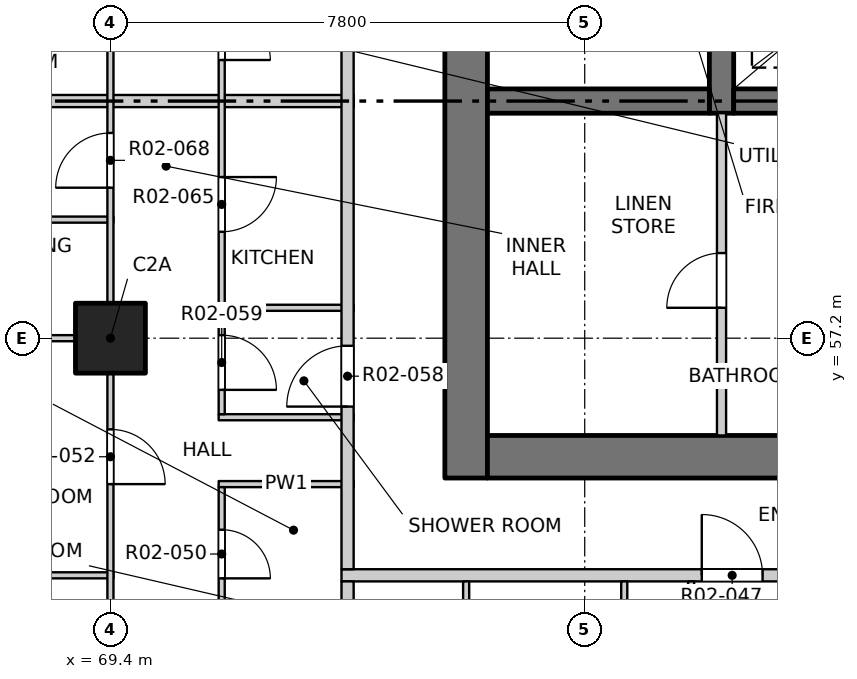
"""IFC4 building model, lengths in metres.
Left out: names, types, materials, properties, quantities, classifications, styles, units other than length and angle.
Written with IfcOpenShell. Run it as: python <this file> out.ifc"""

import sys

from ifc_helpers import new_model, si_unit, direction, frame, frame_2d, origin, origin_2d, place, context, subcontext, project, spatial, rectangle, extrude, element, fill, save


model = new_model("IFC4")
c1 = context("Model", 3, precision=1e-05, world=origin(), true_north=direction((0.0, 1.0)))
c2 = subcontext(c1, "Body", "Model", "MODEL_VIEW")
j1 = project(units=[si_unit("LENGTHUNIT", "METRE"), si_unit("PLANEANGLEUNIT", "RADIAN")], contexts=[c1])
p1 = place(None, origin())
s1 = spatial("IfcSite", under=j1, at=p1, CompositionType="ELEMENT")
p2 = place(p1, origin())
s2 = spatial("IfcBuilding", under=s1, at=p2, CompositionType="ELEMENT")
p3 = place(p2, frame((0.0, 0.0, 29.7)))
s3 = spatial("IfcBuildingStorey", under=s2, at=p3, CompositionType="ELEMENT", Elevation=29.7)
p4 = place(p3, frame((69.4, 57.2, -0.25), z_axis=(0.0, 0.0, 1.0), x_axis=(1.0, 0.0, 0.0)))
e1 = element("IfcColumn", 1, at=p4, inside=s3, PredefinedType="COLUMN", context=c2, shape_type="SweptSolid", body=[
    extrude(rectangle(XDim=1.15, YDim=1.15, at=origin_2d()), origin(), (0.0, 0.0, 1.0), 3.4),
])
p5 = place(p3, frame((75.25, 54.9, -0.25), z_axis=(0.0, 0.0, 1.0), x_axis=(0.0, 1.0, 0.0)))
e2 = element("IfcWall", 2, at=p5, inside=s3, PredefinedType="SOLIDWALL", context=c2, shape_type="SweptSolid", body=[
    extrude(rectangle(XDim=22.4, YDim=0.7, at=frame_2d((11.2, 0.0))), origin(), (0.0, 0.0, 1.0), 3.4),
])
p6 = place(p5, frame((7.55, 0.0, 0.25)))
e3 = element("IfcOpeningElement", 3, at=p6, cuts=e2, PredefinedType="OPENING", context=c2, shape_type="SweptSolid", body=[
    extrude(rectangle(XDim=0.9, YDim=2.1, at=frame_2d((0.45, 1.05))), frame((0.0, 0.36, 0.0), z_axis=(0.0, -1.0, 0.0), x_axis=(1.0, 0.0, 0.0)), (0.0, 0.0, 1.0), 0.72),
])
p7 = place(p5, frame((10.85, 0.0, 0.25)))
e4 = element("IfcOpeningElement", 4, at=p7, cuts=e2, PredefinedType="OPENING", context=c2, shape_type="SweptSolid", body=[
    extrude(rectangle(XDim=0.9, YDim=2.1, at=frame_2d((0.45, 1.05))), frame((0.0, 0.36, 0.0), z_axis=(0.0, -1.0, 0.0), x_axis=(1.0, 0.0, 0.0)), (0.0, 0.0, 1.0), 0.72),
])
p8 = place(p5, frame((13.85, 0.0, 0.25)))
e5 = element("IfcOpeningElement", 5, at=p8, cuts=e2, PredefinedType="OPENING", context=c2, shape_type="SweptSolid", body=[
    extrude(rectangle(XDim=0.9, YDim=2.1, at=frame_2d((0.45, 1.05))), frame((0.0, 0.36, 0.0), z_axis=(0.0, -1.0, 0.0), x_axis=(1.0, 0.0, 0.0)), (0.0, 0.0, 1.0), 0.72),
])
p9 = place(p5, frame((16.85, 0.0, 0.25)))
e6 = element("IfcOpeningElement", 6, at=p9, cuts=e2, PredefinedType="OPENING", context=c2, shape_type="SweptSolid", body=[
    extrude(rectangle(XDim=0.9, YDim=2.1, at=frame_2d((0.45, 1.05))), frame((0.0, 0.36, 0.0), z_axis=(0.0, -1.0, 0.0), x_axis=(1.0, 0.0, 0.0)), (0.0, 0.0, 1.0), 0.72),
])
p10 = place(p5, frame((20.15, 0.0, 0.25)))
e7 = element("IfcOpeningElement", 7, at=p10, cuts=e2, PredefinedType="OPENING", context=c2, shape_type="SweptSolid", body=[
    extrude(rectangle(XDim=0.9, YDim=2.1, at=frame_2d((0.45, 1.05))), frame((0.0, 0.36, 0.0), z_axis=(0.0, -1.0, 0.0), x_axis=(1.0, 0.0, 0.0)), (0.0, 0.0, 1.0), 0.72),
])
p11 = place(p3, frame((75.6, 55.25, -0.25), z_axis=(0.0, 0.0, 1.0), x_axis=(1.0, 0.0, 0.0)))
e8 = element("IfcWall", 8, at=p11, inside=s3, PredefinedType="SOLIDWALL", context=c2, shape_type="SweptSolid", body=[
    extrude(rectangle(XDim=18.8, YDim=0.7, at=frame_2d((9.4, 0.0))), origin(), (0.0, 0.0, 1.0), 3.4),
])
p12 = place(p11, frame((8.65, 0.0, 0.25)))
e9 = element("IfcOpeningElement", 9, at=p12, cuts=e8, PredefinedType="OPENING", context=c2, shape_type="SweptSolid", body=[
    extrude(rectangle(XDim=1.5, YDim=2.1, at=frame_2d((0.75, 1.05))), frame((0.0, 0.36, 0.0), z_axis=(0.0, -1.0, 0.0), x_axis=(1.0, 0.0, 0.0)), (0.0, 0.0, 1.0), 0.72),
])
p13 = place(p3, frame((79.45, 60.9, -0.25), z_axis=(0.0, 0.0, 1.0), x_axis=(0.0, 1.0, 0.0)))
e10 = element("IfcWall", 10, at=p13, inside=s3, PredefinedType="SOLIDWALL", context=c2, shape_type="SweptSolid", body=[
    extrude(rectangle(XDim=16.4, YDim=0.4, at=frame_2d((8.2, 0.0))), origin(), (0.0, 0.0, 1.0), 3.4),
])
p14 = place(p3, frame((79.65, 61.1, -0.25), z_axis=(0.0, 0.0, 1.0), x_axis=(1.0, 0.0, 0.0)))
e11 = element("IfcWall", 11, at=p14, inside=s3, PredefinedType="SOLIDWALL", context=c2, shape_type="SweptSolid", body=[
    extrude(rectangle(XDim=3.0, YDim=0.4, at=frame_2d((1.5, 0.0))), origin(), (0.0, 0.0, 1.0), 3.4),
])
p15 = place(p3, frame((75.6, 61.1, -0.25), z_axis=(0.0, 0.0, 1.0), x_axis=(1.0, 0.0, 0.0)))
e12 = element("IfcWall", 12, at=p15, inside=s3, PredefinedType="SOLIDWALL", context=c2, shape_type="SweptSolid", body=[
    extrude(rectangle(XDim=3.65, YDim=0.4, at=frame_2d((1.825, 0.0))), origin(), (0.0, 0.0, 1.0), 3.4),
])
p16 = place(p3, frame((61.9, 53.3, 0.0), z_axis=(0.0, 0.0, 1.0), x_axis=(1.0, 0.0, 0.0)))
e13 = element("IfcWall", 13, at=p16, inside=s3, PredefinedType="PARTITIONING", context=c2, shape_type="SweptSolid", body=[
    extrude(rectangle(XDim=7.55, YDim=0.1, at=frame_2d((3.775, 0.0))), origin(), (0.0, 0.0, 1.0), 3.15),
])
p17 = place(p3, frame((73.2, 53.3, 0.0), z_axis=(0.0, 0.0, 1.0), x_axis=(1.0, 0.0, 0.0)))
e14 = element("IfcWall", 14, at=p17, inside=s3, PredefinedType="PARTITIONING", context=c2, shape_type="SweptSolid", body=[
    extrude(rectangle(XDim=23.6, YDim=0.2, at=frame_2d((11.8, 0.0))), origin(), (0.0, 0.0, 1.0), 3.15),
])
p18 = place(p17, frame((5.925, 0.0, 0.0)))
e15 = element("IfcOpeningElement", 15, at=p18, cuts=e14, PredefinedType="OPENING", context=c2, shape_type="SweptSolid", body=[
    extrude(rectangle(XDim=1.0, YDim=2.1, at=frame_2d((0.5, 1.05))), frame((0.0, 0.11, 0.0), z_axis=(0.0, -1.0, 0.0), x_axis=(1.0, 0.0, 0.0)), (0.0, 0.0, 1.0), 0.22),
])
p19 = place(p17, frame((17.925, 0.0, 0.0)))
e16 = element("IfcOpeningElement", 16, at=p19, cuts=e14, PredefinedType="OPENING", context=c2, shape_type="SweptSolid", body=[
    extrude(rectangle(XDim=1.0, YDim=2.1, at=frame_2d((0.5, 1.05))), frame((0.0, 0.11, 0.0), z_axis=(0.0, -1.0, 0.0), x_axis=(1.0, 0.0, 0.0)), (0.0, 0.0, 1.0), 0.22),
])
for number, where, z_axis, x_axis in (
    (17, (71.18, 54.8, 0.0), (0.0, 0.0, 1.0), (1.0, 0.0, 0.0)),
    (18, (71.18, 55.9, 0.0), (0.0, 0.0, 1.0), (1.0, 0.0, 0.0)),
):
    element("IfcWall", number, at=place(p3, frame(where, z_axis=z_axis, x_axis=x_axis)), inside=s3, PredefinedType="PARTITIONING", context=c2, shape_type="SweptSolid", body=[
        extrude(rectangle(XDim=2.22, YDim=0.1, at=frame_2d((1.11, 0.0))), origin(), (0.0, 0.0, 1.0), 3.15),
    ])
p20 = place(p3, frame((61.9, 57.2, 0.0), z_axis=(0.0, 0.0, 1.0), x_axis=(1.0, 0.0, 0.0)))
e19 = element("IfcWall", 19, at=p20, inside=s3, PredefinedType="PARTITIONING", context=c2, shape_type="SweptSolid", body=[
    extrude(rectangle(XDim=7.55, YDim=0.1, at=frame_2d((3.775, 0.0))), origin(), (0.0, 0.0, 1.0), 2.55),
])
p21 = place(p3, frame((71.18, 57.7, 0.0), z_axis=(0.0, 0.0, 1.0), x_axis=(1.0, 0.0, 0.0)))
e20 = element("IfcWall", 20, at=p21, inside=s3, PredefinedType="PARTITIONING", context=c2, shape_type="SweptSolid", body=[
    extrude(rectangle(XDim=2.22, YDim=0.1, at=frame_2d((1.11, 0.0))), origin(), (0.0, 0.0, 1.0), 3.15),
])
p22 = place(p3, frame((66.05, 59.15, 0.0), z_axis=(0.0, 0.0, 1.0), x_axis=(1.0, 0.0, 0.0)))
e21 = element("IfcWall", 21, at=p22, inside=s3, PredefinedType="PARTITIONING", context=c2, shape_type="SweptSolid", body=[
    extrude(rectangle(XDim=3.4, YDim=0.1, at=frame_2d((1.7, 0.0))), origin(), (0.0, 0.0, 1.0), 3.15),
])
p23 = place(p3, frame((61.9, 61.1, 0.0), z_axis=(0.0, 0.0, 1.0), x_axis=(1.0, 0.0, 0.0)))
e22 = element("IfcWall", 22, at=p23, inside=s3, PredefinedType="PARTITIONING", context=c2, shape_type="SweptSolid", body=[
    extrude(rectangle(XDim=11.5, YDim=0.2, at=frame_2d((5.75, 0.0))), origin(), (0.0, 0.0, 1.0), 3.15),
])
p24 = place(p3, frame((69.4, 49.4, 0.0), z_axis=(0.0, 0.0, 1.0), x_axis=(0.0, 1.0, 0.0)))
e23 = element("IfcWall", 23, at=p24, inside=s3, PredefinedType="PARTITIONING", context=c2, shape_type="SweptSolid", body=[
    extrude(rectangle(XDim=31.2, YDim=0.1, at=frame_2d((15.6, 0.0))), origin(), (0.0, 0.0, 1.0), 3.15),
])
p25 = place(p24, frame((2.475, 0.0, 0.0)))
e24 = element("IfcOpeningElement", 24, at=p25, cuts=e23, PredefinedType="OPENING", context=c2, shape_type="SweptSolid", body=[
    extrude(rectangle(XDim=0.9, YDim=2.1, at=frame_2d((0.45, 1.05))), frame((0.0, 0.06, 0.0), z_axis=(0.0, -1.0, 0.0), x_axis=(1.0, 0.0, 0.0)), (0.0, 0.0, 1.0), 0.12),
])
p26 = place(p24, frame((5.4, 0.0, 0.0)))
e25 = element("IfcOpeningElement", 25, at=p26, cuts=e23, PredefinedType="OPENING", context=c2, shape_type="SweptSolid", body=[
    extrude(rectangle(XDim=0.9, YDim=2.1, at=frame_2d((0.45, 1.05))), frame((0.0, 0.06, 0.0), z_axis=(0.0, -1.0, 0.0), x_axis=(1.0, 0.0, 0.0)), (0.0, 0.0, 1.0), 0.12),
])
p27 = place(p24, frame((10.275, 0.0, 0.0)))
e26 = element("IfcOpeningElement", 26, at=p27, cuts=e23, PredefinedType="OPENING", context=c2, shape_type="SweptSolid", body=[
    extrude(rectangle(XDim=0.9, YDim=2.1, at=frame_2d((0.45, 1.05))), frame((0.0, 0.06, 0.0), z_axis=(0.0, -1.0, 0.0), x_axis=(1.0, 0.0, 0.0)), (0.0, 0.0, 1.0), 0.12),
])
p28 = place(p24, frame((14.0, 0.0, 0.0)))
e27 = element("IfcOpeningElement", 27, at=p28, cuts=e23, PredefinedType="OPENING", context=c2, shape_type="SweptSolid", body=[
    extrude(rectangle(XDim=0.9, YDim=2.1, at=frame_2d((0.45, 1.05))), frame((0.0, 0.06, 0.0), z_axis=(0.0, -1.0, 0.0), x_axis=(1.0, 0.0, 0.0)), (0.0, 0.0, 1.0), 0.12),
])
p29 = place(p24, frame((17.1, 0.0, 0.0)))
e28 = element("IfcOpeningElement", 28, at=p29, cuts=e23, PredefinedType="OPENING", context=c2, shape_type="SweptSolid", body=[
    extrude(rectangle(XDim=0.9, YDim=2.1, at=frame_2d((0.45, 1.05))), frame((0.0, 0.06, 0.0), z_axis=(0.0, -1.0, 0.0), x_axis=(1.0, 0.0, 0.0)), (0.0, 0.0, 1.0), 0.12),
])
p30 = place(p24, frame((21.8, 0.0, 0.0)))
e29 = element("IfcOpeningElement", 29, at=p30, cuts=e23, PredefinedType="OPENING", context=c2, shape_type="SweptSolid", body=[
    extrude(rectangle(XDim=0.9, YDim=2.1, at=frame_2d((0.45, 1.05))), frame((0.0, 0.06, 0.0), z_axis=(0.0, -1.0, 0.0), x_axis=(1.0, 0.0, 0.0)), (0.0, 0.0, 1.0), 0.12),
])
p31 = place(p24, frame((25.875, 0.0, 0.0)))
e30 = element("IfcOpeningElement", 30, at=p31, cuts=e23, PredefinedType="OPENING", context=c2, shape_type="SweptSolid", body=[
    extrude(rectangle(XDim=0.9, YDim=2.1, at=frame_2d((0.45, 1.05))), frame((0.0, 0.06, 0.0), z_axis=(0.0, -1.0, 0.0), x_axis=(1.0, 0.0, 0.0)), (0.0, 0.0, 1.0), 0.12),
])
p32 = place(p24, frame((29.6, 0.0, 0.0)))
e31 = element("IfcOpeningElement", 31, at=p32, cuts=e23, PredefinedType="OPENING", context=c2, shape_type="SweptSolid", body=[
    extrude(rectangle(XDim=0.9, YDim=2.1, at=frame_2d((0.45, 1.05))), frame((0.0, 0.06, 0.0), z_axis=(0.0, -1.0, 0.0), x_axis=(1.0, 0.0, 0.0)), (0.0, 0.0, 1.0), 0.12),
])
p33 = place(p3, frame((71.23, 45.55, 0.0), z_axis=(0.0, 0.0, 1.0), x_axis=(0.0, 1.0, 0.0)))
e32 = element("IfcWall", 32, at=p33, inside=s3, PredefinedType="PARTITIONING", context=c2, shape_type="SweptSolid", body=[
    extrude(rectangle(XDim=9.2, YDim=0.1, at=frame_2d((4.6, 0.0))), origin(), (0.0, 0.0, 1.0), 3.15),
])
p34 = place(p33, frame((0.7, 0.0, 0.0)))
e33 = element("IfcOpeningElement", 33, at=p34, cuts=e32, PredefinedType="OPENING", context=c2, shape_type="SweptSolid", body=[
    extrude(rectangle(XDim=0.9, YDim=2.1, at=frame_2d((0.45, 1.05))), frame((0.0, 0.06, 0.0), z_axis=(0.0, -1.0, 0.0), x_axis=(1.0, 0.0, 0.0)), (0.0, 0.0, 1.0), 0.12),
])
p35 = place(p33, frame((3.1, 0.0, 0.0)))
e34 = element("IfcOpeningElement", 34, at=p35, cuts=e32, PredefinedType="OPENING", context=c2, shape_type="SweptSolid", body=[
    extrude(rectangle(XDim=0.8, YDim=2.1, at=frame_2d((0.4, 1.05))), frame((0.0, 0.06, 0.0), z_axis=(0.0, -1.0, 0.0), x_axis=(1.0, 0.0, 0.0)), (0.0, 0.0, 1.0), 0.12),
])
p36 = place(p33, frame((5.4, 0.0, 0.0)))
e35 = element("IfcOpeningElement", 35, at=p36, cuts=e32, PredefinedType="OPENING", context=c2, shape_type="SweptSolid", body=[
    extrude(rectangle(XDim=0.8, YDim=2.1, at=frame_2d((0.4, 1.05))), frame((0.0, 0.06, 0.0), z_axis=(0.0, -1.0, 0.0), x_axis=(1.0, 0.0, 0.0)), (0.0, 0.0, 1.0), 0.12),
])
p37 = place(p33, frame((7.7, 0.0, 0.0)))
e36 = element("IfcOpeningElement", 36, at=p37, cuts=e32, PredefinedType="OPENING", context=c2, shape_type="SweptSolid", body=[
    extrude(rectangle(XDim=0.8, YDim=2.1, at=frame_2d((0.4, 1.05))), frame((0.0, 0.06, 0.0), z_axis=(0.0, -1.0, 0.0), x_axis=(1.0, 0.0, 0.0)), (0.0, 0.0, 1.0), 0.12),
])
p38 = place(p3, frame((71.23, 55.95, 0.0), z_axis=(0.0, 0.0, 1.0), x_axis=(0.0, 1.0, 0.0)))
e37 = element("IfcWall", 37, at=p38, inside=s3, PredefinedType="PARTITIONING", context=c2, shape_type="SweptSolid", body=[
    extrude(rectangle(XDim=14.25, YDim=0.1, at=frame_2d((7.125, 0.0))), origin(), (0.0, 0.0, 1.0), 3.15),
])
p39 = place(p38, frame((0.4, 0.0, 0.0)))
e38 = element("IfcOpeningElement", 38, at=p39, cuts=e37, PredefinedType="OPENING", context=c2, shape_type="SweptSolid", body=[
    extrude(rectangle(XDim=0.9, YDim=2.1, at=frame_2d((0.45, 1.05))), frame((0.0, 0.06, 0.0), z_axis=(0.0, -1.0, 0.0), x_axis=(1.0, 0.0, 0.0)), (0.0, 0.0, 1.0), 0.12),
])
p40 = place(p38, frame((3.0, 0.0, 0.0)))
e39 = element("IfcOpeningElement", 39, at=p40, cuts=e37, PredefinedType="OPENING", context=c2, shape_type="SweptSolid", body=[
    extrude(rectangle(XDim=0.9, YDim=2.1, at=frame_2d((0.45, 1.05))), frame((0.0, 0.06, 0.0), z_axis=(0.0, -1.0, 0.0), x_axis=(1.0, 0.0, 0.0)), (0.0, 0.0, 1.0), 0.12),
])
p41 = place(p38, frame((5.825, 0.0, 0.0)))
e40 = element("IfcOpeningElement", 40, at=p41, cuts=e37, PredefinedType="OPENING", context=c2, shape_type="SweptSolid", body=[
    extrude(rectangle(XDim=0.8, YDim=2.1, at=frame_2d((0.4, 1.05))), frame((0.0, 0.06, 0.0), z_axis=(0.0, -1.0, 0.0), x_axis=(1.0, 0.0, 0.0)), (0.0, 0.0, 1.0), 0.12),
])
p42 = place(p38, frame((8.05, 0.0, 0.0)))
e41 = element("IfcOpeningElement", 41, at=p42, cuts=e37, PredefinedType="OPENING", context=c2, shape_type="SweptSolid", body=[
    extrude(rectangle(XDim=0.8, YDim=2.1, at=frame_2d((0.4, 1.05))), frame((0.0, 0.06, 0.0), z_axis=(0.0, -1.0, 0.0), x_axis=(1.0, 0.0, 0.0)), (0.0, 0.0, 1.0), 0.12),
])
p43 = place(p38, frame((10.35, 0.0, 0.0)))
e42 = element("IfcOpeningElement", 42, at=p43, cuts=e37, PredefinedType="OPENING", context=c2, shape_type="SweptSolid", body=[
    extrude(rectangle(XDim=0.8, YDim=2.1, at=frame_2d((0.4, 1.05))), frame((0.0, 0.06, 0.0), z_axis=(0.0, -1.0, 0.0), x_axis=(1.0, 0.0, 0.0)), (0.0, 0.0, 1.0), 0.12),
])
p44 = place(p38, frame((12.65, 0.0, 0.0)))
e43 = element("IfcOpeningElement", 43, at=p44, cuts=e37, PredefinedType="OPENING", context=c2, shape_type="SweptSolid", body=[
    extrude(rectangle(XDim=0.9, YDim=2.1, at=frame_2d((0.45, 1.05))), frame((0.0, 0.06, 0.0), z_axis=(0.0, -1.0, 0.0), x_axis=(1.0, 0.0, 0.0)), (0.0, 0.0, 1.0), 0.12),
])
p45 = place(p3, frame((73.3, 41.9, 0.0), z_axis=(0.0, 0.0, 1.0), x_axis=(0.0, 1.0, 0.0)))
e44 = element("IfcWall", 44, at=p45, inside=s3, PredefinedType="PARTITIONING", context=c2, shape_type="SweptSolid", body=[
    extrude(rectangle(XDim=11.3, YDim=0.2, at=frame_2d((5.65, 0.0))), origin(), (0.0, 0.0, 1.0), 3.15),
])
p46 = place(p3, frame((73.3, 53.4, 0.0), z_axis=(0.0, 0.0, 1.0), x_axis=(0.0, 1.0, 0.0)))
e45 = element("IfcWall", 45, at=p46, inside=s3, PredefinedType="PARTITIONING", context=c2, shape_type="SweptSolid", body=[
    extrude(rectangle(XDim=31.0, YDim=0.2, at=frame_2d((15.5, 0.0))), origin(), (0.0, 0.0, 1.0), 3.15),
])
p47 = place(p46, frame((2.675, 0.0, 0.0)))
e46 = element("IfcOpeningElement", 46, at=p47, cuts=e45, PredefinedType="OPENING", context=c2, shape_type="SweptSolid", body=[
    extrude(rectangle(XDim=1.0, YDim=2.1, at=frame_2d((0.5, 1.05))), frame((0.0, 0.11, 0.0), z_axis=(0.0, -1.0, 0.0), x_axis=(1.0, 0.0, 0.0)), (0.0, 0.0, 1.0), 0.22),
])
p48 = place(p46, frame((18.125, 0.0, 0.0)))
e47 = element("IfcOpeningElement", 47, at=p48, cuts=e45, PredefinedType="OPENING", context=c2, shape_type="SweptSolid", body=[
    extrude(rectangle(XDim=1.0, YDim=2.1, at=frame_2d((0.5, 1.05))), frame((0.0, 0.11, 0.0), z_axis=(0.0, -1.0, 0.0), x_axis=(1.0, 0.0, 0.0)), (0.0, 0.0, 1.0), 0.22),
])
p49 = place(p46, frame((26.025, 0.0, 0.0)))
e48 = element("IfcOpeningElement", 48, at=p49, cuts=e45, PredefinedType="OPENING", context=c2, shape_type="SweptSolid", body=[
    extrude(rectangle(XDim=1.0, YDim=2.1, at=frame_2d((0.5, 1.05))), frame((0.0, 0.11, 0.0), z_axis=(0.0, -1.0, 0.0), x_axis=(1.0, 0.0, 0.0)), (0.0, 0.0, 1.0), 0.22),
])
for number, where, z_axis, x_axis in (
    (49, (75.25, 51.28, 0.0), (0.0, 0.0, 1.0), (0.0, 1.0, 0.0)),
    (50, (77.85, 51.28, 0.0), (0.0, 0.0, 1.0), (0.0, 1.0, 0.0)),
    (51, (78.95, 51.28, 0.0), (0.0, 0.0, 1.0), (0.0, 1.0, 0.0)),
):
    element("IfcWall", number, at=place(p3, frame(where, z_axis=z_axis, x_axis=x_axis)), inside=s3, PredefinedType="PARTITIONING", context=c2, shape_type="SweptSolid", body=[
        extrude(rectangle(XDim=1.92, YDim=0.1, at=frame_2d((0.96, 0.0))), origin(), (0.0, 0.0, 1.0), 3.15),
    ])
p50 = place(p3, frame((79.45, 55.6, 0.0), z_axis=(0.0, 0.0, 1.0), x_axis=(0.0, 1.0, 0.0)))
e52 = element("IfcWall", 52, at=p50, inside=s3, PredefinedType="PARTITIONING", context=c2, shape_type="SweptSolid", body=[
    extrude(rectangle(XDim=5.3, YDim=0.15, at=frame_2d((2.65, 0.0))), origin(), (0.0, 0.0, 1.0), 3.15),
])
p51 = place(p50, frame((2.1, 0.0, 0.0)))
e53 = element("IfcOpeningElement", 53, at=p51, cuts=e52, PredefinedType="OPENING", context=c2, shape_type="SweptSolid", body=[
    extrude(rectangle(XDim=0.9, YDim=2.1, at=frame_2d((0.45, 1.05))), frame((0.0, 0.085, 0.0), z_axis=(0.0, -1.0, 0.0), x_axis=(1.0, 0.0, 0.0)), (0.0, 0.0, 1.0), 0.17),
])
p52 = place(p18, origin())
e54 = element("IfcDoor", 54, at=p52, inside=s3, OperationType="SINGLE_SWING_LEFT", PredefinedType="DOOR", context=c2, shape_type="SweptSolid", body=[
    extrude(rectangle(XDim=1.0, YDim=2.1, at=frame_2d((0.5, 1.05))), frame((0.0, 0.025, 0.0), z_axis=(0.0, -1.0, 0.0), x_axis=(1.0, 0.0, 0.0)), (0.0, 0.0, 1.0), 0.05),
])
fill(e15, e54)
p53 = place(p37, origin())
e55 = element("IfcDoor", 55, at=p53, inside=s3, OperationType="SINGLE_SWING_RIGHT", PredefinedType="DOOR", context=c2, shape_type="SweptSolid", body=[
    extrude(rectangle(XDim=0.8, YDim=2.1, at=frame_2d((0.4, 1.05))), frame((0.0, 0.025, 0.0), z_axis=(0.0, -1.0, 0.0), x_axis=(1.0, 0.0, 0.0)), (0.0, 0.0, 1.0), 0.05),
])
fill(e36, e55)
p54 = place(p26, origin())
e56 = element("IfcDoor", 56, at=p54, inside=s3, OperationType="SINGLE_SWING_RIGHT", PredefinedType="DOOR", context=c2, shape_type="SweptSolid", body=[
    extrude(rectangle(XDim=0.9, YDim=2.1, at=frame_2d((0.45, 1.05))), frame((0.0, 0.025, 0.0), z_axis=(0.0, -1.0, 0.0), x_axis=(1.0, 0.0, 0.0)), (0.0, 0.0, 1.0), 0.05),
])
fill(e25, e56)
p55 = place(p47, origin())
e57 = element("IfcDoor", 57, at=p55, inside=s3, OperationType="SINGLE_SWING_RIGHT", PredefinedType="DOOR", context=c2, shape_type="SweptSolid", body=[
    extrude(rectangle(XDim=1.0, YDim=2.1, at=frame_2d((0.5, 1.05))), frame((0.0, 0.025, 0.0), z_axis=(0.0, -1.0, 0.0), x_axis=(1.0, 0.0, 0.0)), (0.0, 0.0, 1.0), 0.05),
])
fill(e46, e57)
p56 = place(p39, origin())
e58 = element("IfcDoor", 58, at=p56, inside=s3, OperationType="SINGLE_SWING_RIGHT", PredefinedType="DOOR", context=c2, shape_type="SweptSolid", body=[
    extrude(rectangle(XDim=0.9, YDim=2.1, at=frame_2d((0.45, 1.05))), frame((0.0, 0.025, 0.0), z_axis=(0.0, -1.0, 0.0), x_axis=(1.0, 0.0, 0.0)), (0.0, 0.0, 1.0), 0.05),
])
fill(e38, e58)
p57 = place(p51, origin())
e59 = element("IfcDoor", 59, at=p57, inside=s3, OperationType="SINGLE_SWING_LEFT", PredefinedType="DOOR", context=c2, shape_type="SweptSolid", body=[
    extrude(rectangle(XDim=0.9, YDim=2.1, at=frame_2d((0.45, 1.05))), frame((0.0, 0.025, 0.0), z_axis=(0.0, -1.0, 0.0), x_axis=(1.0, 0.0, 0.0)), (0.0, 0.0, 1.0), 0.05),
])
fill(e53, e59)
p58 = place(p40, origin())
e60 = element("IfcDoor", 60, at=p58, inside=s3, OperationType="SINGLE_SWING_LEFT", PredefinedType="DOOR", context=c2, shape_type="SweptSolid", body=[
    extrude(rectangle(XDim=0.9, YDim=2.1, at=frame_2d((0.45, 1.05))), frame((0.0, 0.025, 0.0), z_axis=(0.0, -1.0, 0.0), x_axis=(1.0, 0.0, 0.0)), (0.0, 0.0, 1.0), 0.05),
])
fill(e39, e60)
p59 = place(p27, origin())
e61 = element("IfcDoor", 61, at=p59, inside=s3, OperationType="SINGLE_SWING_LEFT", PredefinedType="DOOR", context=c2, shape_type="SweptSolid", body=[
    extrude(rectangle(XDim=0.9, YDim=2.1, at=frame_2d((0.45, 1.05))), frame((0.0, 0.025, 0.0), z_axis=(0.0, -1.0, 0.0), x_axis=(1.0, 0.0, 0.0)), (0.0, 0.0, 1.0), 0.05),
])
fill(e26, e61)
p60 = place(p41, origin())
e62 = element("IfcDoor", 62, at=p60, inside=s3, OperationType="SINGLE_SWING_RIGHT", PredefinedType="DOOR", context=c2, shape_type="SweptSolid", body=[
    extrude(rectangle(XDim=0.8, YDim=2.1, at=frame_2d((0.4, 1.05))), frame((0.0, 0.025, 0.0), z_axis=(0.0, -1.0, 0.0), x_axis=(1.0, 0.0, 0.0)), (0.0, 0.0, 1.0), 0.05),
])
fill(e40, e62)
save(model, sys.argv[1])
